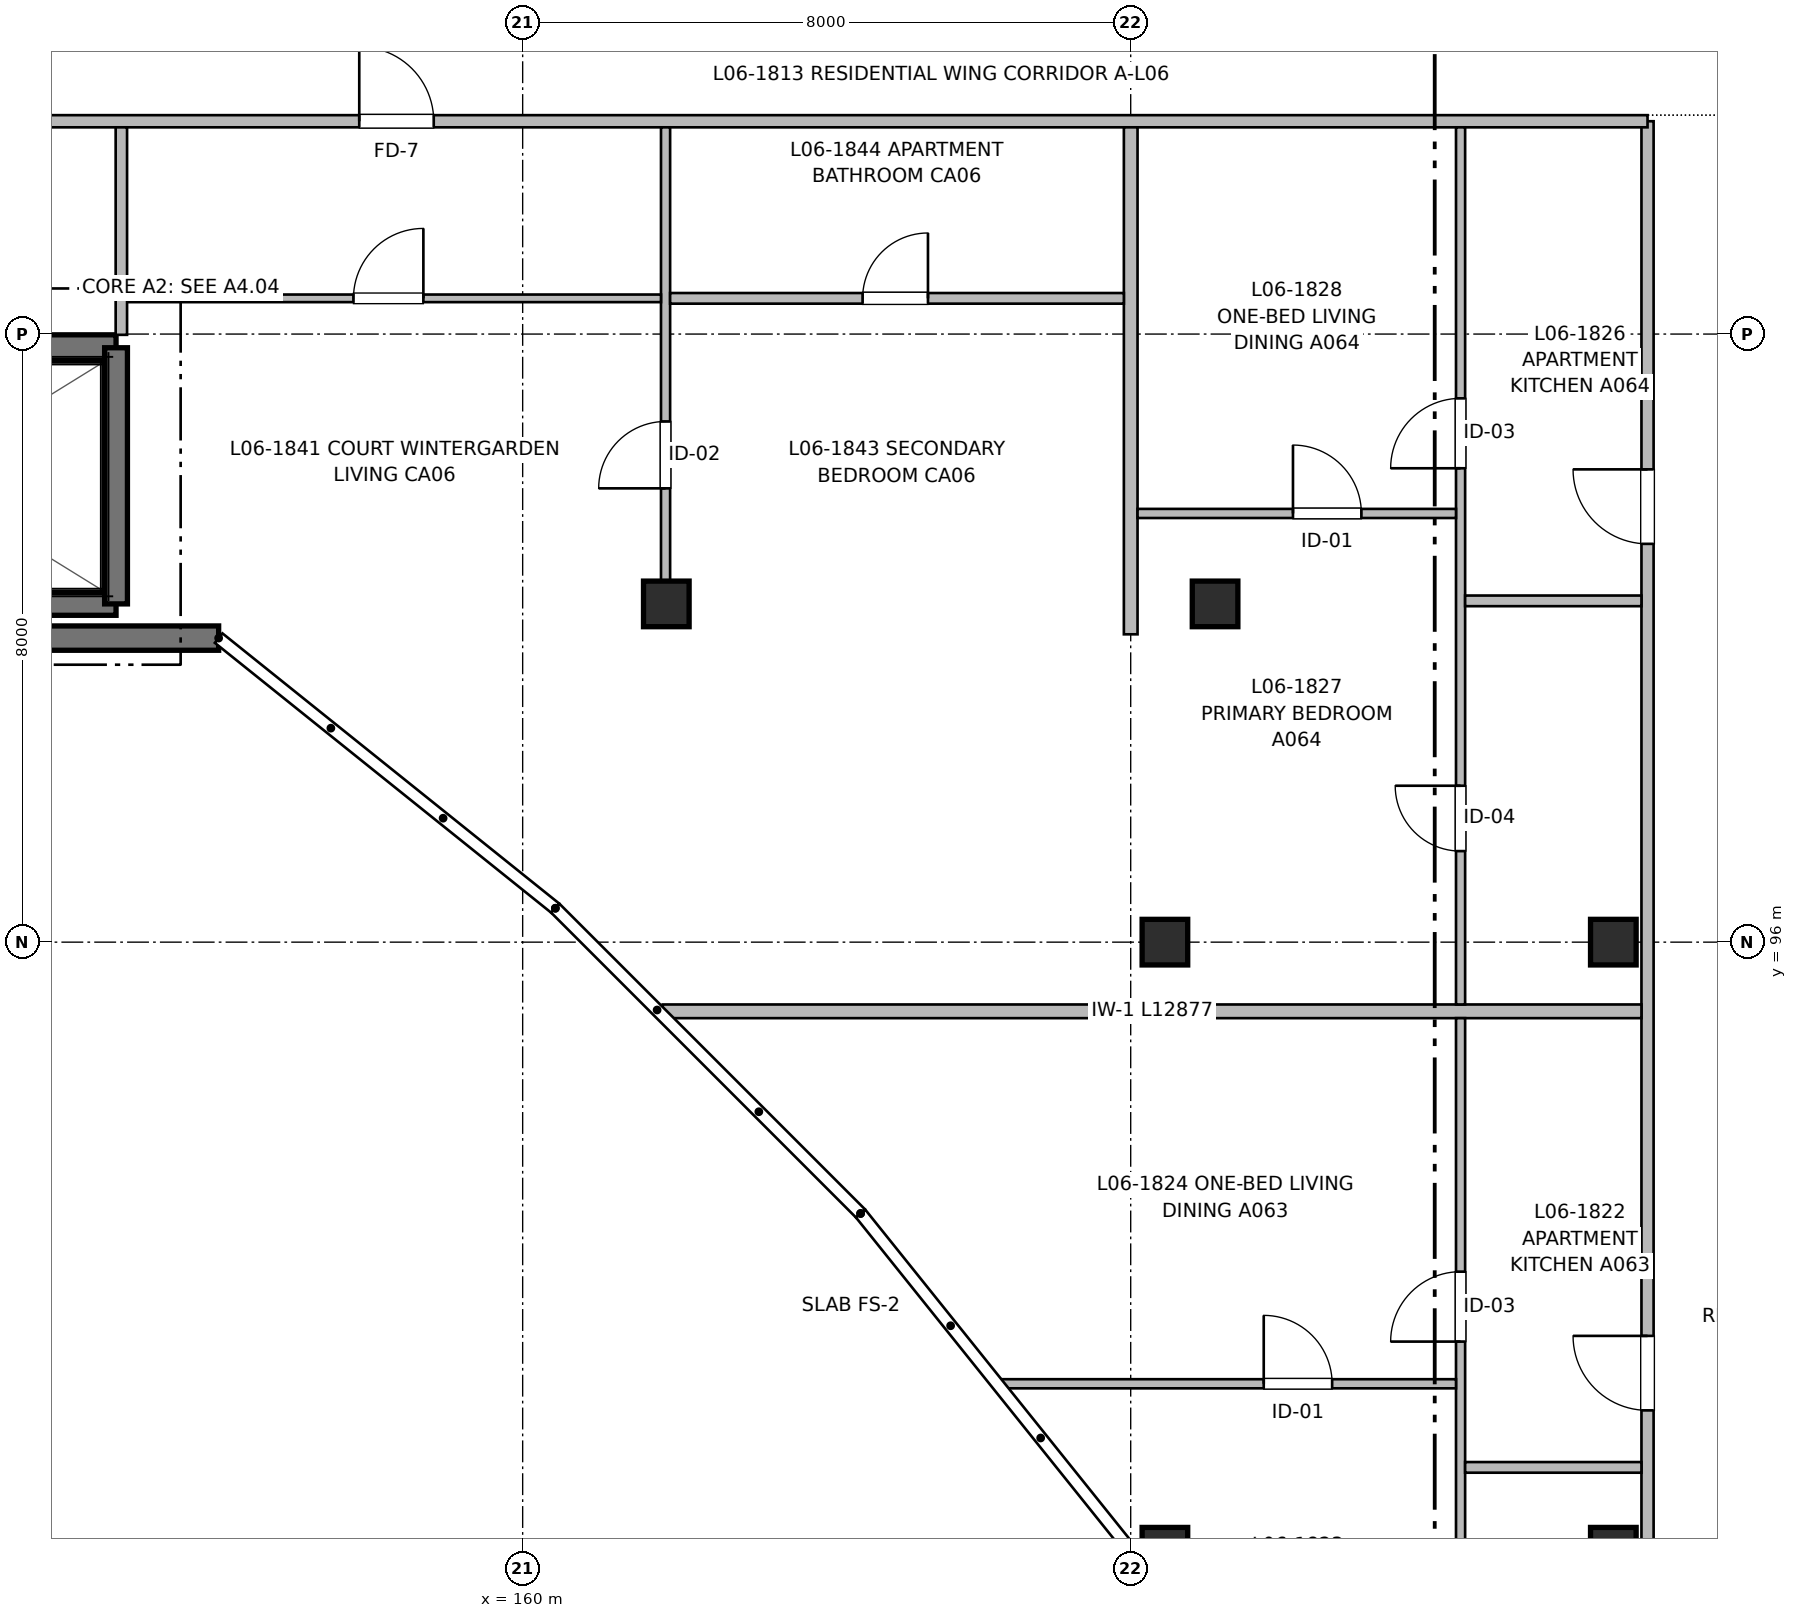
"""IFC4 building model, lengths in metres.
Left out: names, types, materials, properties, quantities, classifications, styles, units other than length and angle.
Written with IfcOpenShell. Run it as: python <this file> out.ifc"""

import sys

from ifc_helpers import new_model, si_unit, direction, frame, frame_2d, origin, origin_2d, place, context, subcontext, project, spatial, rectangle, extrude, element, fill, save


model = new_model("IFC4")
c1 = context("Model", 3, precision=1e-05, world=origin(), true_north=direction((0.0, 1.0)))
c2 = subcontext(c1, "Body", "Model", "MODEL_VIEW")
j1 = project(units=[si_unit("LENGTHUNIT", "METRE"), si_unit("PLANEANGLEUNIT", "RADIAN")], contexts=[c1])
p1 = place(None, origin())
s1 = spatial("IfcSite", under=j1, at=p1, CompositionType="ELEMENT")
p2 = place(p1, origin())
s2 = spatial("IfcBuilding", under=s1, at=p2, CompositionType="ELEMENT")
p3 = place(p2, frame((0.0, 0.0, 20.16)))
s3 = spatial("IfcBuildingStorey", under=s2, at=p3, CompositionType="ELEMENT", Elevation=20.16)
for number, where, z_axis, x_axis in (
    (1, (161.89, 100.45, 0.0), (0.0, 0.0, 1.0), (1.0, 0.0, 0.0)),
    (2, (168.45, 88.0, 0.0), (0.0, 0.0, 1.0), (1.0, 0.0, 0.0)),
    (3, (168.45, 96.0, 0.0), (0.0, 0.0, 1.0), (1.0, 0.0, 0.0)),
    (4, (169.11, 100.45, 0.0), (0.0, 0.0, 1.0), (1.0, 0.0, 0.0)),
    (5, (174.35, 88.0, 0.0), (0.0, 0.0, 1.0), (1.0, 0.0, 0.0)),
    (6, (174.35, 96.0, 0.0), (0.0, 0.0, 1.0), (1.0, 0.0, 0.0)),
):
    element("IfcColumn", number, at=place(p3, frame(where, z_axis=z_axis, x_axis=x_axis)), inside=s3, PredefinedType="COLUMN", context=c2, shape_type="SweptSolid", body=[
        extrude(rectangle(XDim=0.6, YDim=0.6, at=origin_2d()), origin(), (0.0, 0.0, 1.0), 3.2),
    ])
p4 = place(p3, frame((147.75, 100.45, 0.0), z_axis=(0.0, 0.0, 1.0), x_axis=(1.0, 0.0, 0.0)))
e7 = element("IfcWall", 7, at=p4, inside=s3, PredefinedType="SHEAR", context=c2, shape_type="SweptSolid", body=[
    extrude(rectangle(XDim=6.9, YDim=0.3, at=frame_2d((3.45, 0.0))), origin(), (0.0, 0.0, 1.0), 3.2),
])
p5 = place(p3, frame((154.65, 103.82, 0.0), z_axis=(0.0, 0.0, 1.0), x_axis=(-1.0, 0.0, 0.0)))
e8 = element("IfcWall", 8, at=p5, inside=s3, PredefinedType="SHEAR", context=c2, shape_type="SweptSolid", body=[
    extrude(rectangle(XDim=6.9, YDim=0.34, at=frame_2d((3.45, 0.0))), origin(), (0.0, 0.0, 1.0), 3.2),
])
p6 = place(p5, frame((5.25, 0.0, 0.0)))
e9 = element("IfcOpeningElement", 9, at=p6, cuts=e8, PredefinedType="OPENING", context=c2, shape_type="SweptSolid", body=[
    extrude(rectangle(XDim=1.05, YDim=2.15, at=frame_2d((0.525, 1.075))), frame((0.0, 0.18, 0.0), z_axis=(0.0, -1.0, 0.0), x_axis=(1.0, 0.0, 0.0)), (0.0, 0.0, 1.0), 0.36),
])
p7 = place(p3, frame((154.65, 100.45, 0.0), z_axis=(0.0, 0.0, 1.0), x_axis=(0.0, 1.0, 0.0)))
e10 = element("IfcWall", 10, at=p7, inside=s3, PredefinedType="SHEAR", context=c2, shape_type="SweptSolid", body=[
    extrude(rectangle(XDim=3.37, YDim=0.3, at=frame_2d((1.685, 0.0))), origin(), (0.0, 0.0, 1.0), 3.2),
])
p8 = place(p3, frame((156.0, 100.0, 0.0), z_axis=(0.0, 0.0, 1.0), x_axis=(-1.0, 0.0, 0.0)))
e11 = element("IfcWall", 11, at=p8, inside=s3, PredefinedType="SHEAR", context=c2, shape_type="SweptSolid", body=[
    extrude(rectangle(XDim=9.0, YDim=0.32, at=frame_2d((4.5, 0.0))), origin(), (0.0, 0.0, 1.0), 2.98),
])
p9 = place(p8, frame((3.3, 0.0, 0.72)))
e12 = element("IfcOpeningElement", 12, at=p9, cuts=e11, PredefinedType="OPENING", context=c2, shape_type="SweptSolid", body=[
    extrude(rectangle(XDim=2.4, YDim=1.5, at=frame_2d((1.2, 0.75))), frame((0.0, 0.17, 0.0), z_axis=(0.0, -1.0, 0.0), x_axis=(1.0, 0.0, 0.0)), (0.0, 0.0, 1.0), 0.34),
])
p10 = place(p3, frame((174.8, 56.16, 0.0), z_axis=(0.0, 0.0, 1.0), x_axis=(0.0, 1.0, 0.0)))
e13 = element("IfcWall", 13, at=p10, inside=s3, PredefinedType="PARTITIONING", context=c2, shape_type="SweptSolid", body=[
    extrude(rectangle(XDim=50.64, YDim=0.16, at=frame_2d((25.32, 0.0))), origin(), (0.0, 0.0, 1.0), 2.935),
])
p11 = place(p10, frame((5.63, 0.0, 0.0)))
e14 = element("IfcOpeningElement", 14, at=p11, cuts=e13, PredefinedType="OPENING", context=c2, shape_type="SweptSolid", body=[
    extrude(rectangle(XDim=1.5, YDim=2.2, at=frame_2d((0.75, 1.1))), frame((0.0, 0.09, 0.0), z_axis=(0.0, -1.0, 0.0), x_axis=(1.0, 0.0, 0.0)), (0.0, 0.0, 1.0), 0.18),
])
p12 = place(p10, frame((20.92, 0.0, 0.0)))
e15 = element("IfcOpeningElement", 15, at=p12, cuts=e13, PredefinedType="OPENING", context=c2, shape_type="SweptSolid", body=[
    extrude(rectangle(XDim=0.98, YDim=2.15, at=frame_2d((0.49, 1.075))), frame((0.0, 0.09, 0.0), z_axis=(0.0, -1.0, 0.0), x_axis=(1.0, 0.0, 0.0)), (0.0, 0.0, 1.0), 0.18),
])
p13 = place(p10, frame((33.68, 0.0, 0.0)))
e16 = element("IfcOpeningElement", 16, at=p13, cuts=e13, PredefinedType="OPENING", context=c2, shape_type="SweptSolid", body=[
    extrude(rectangle(XDim=0.98, YDim=2.15, at=frame_2d((0.49, 1.075))), frame((0.0, 0.09, 0.0), z_axis=(0.0, -1.0, 0.0), x_axis=(1.0, 0.0, 0.0)), (0.0, 0.0, 1.0), 0.18),
])
p14 = place(p10, frame((45.08, 0.0, 0.0)))
e17 = element("IfcOpeningElement", 17, at=p14, cuts=e13, PredefinedType="OPENING", context=c2, shape_type="SweptSolid", body=[
    extrude(rectangle(XDim=0.98, YDim=2.15, at=frame_2d((0.49, 1.075))), frame((0.0, 0.09, 0.0), z_axis=(0.0, -1.0, 0.0), x_axis=(1.0, 0.0, 0.0)), (0.0, 0.0, 1.0), 0.18),
])
p15 = place(p3, frame((147.16, 106.8, 0.0), z_axis=(0.0, 0.0, 1.0), x_axis=(1.0, 0.0, 0.0)))
e18 = element("IfcWall", 18, at=p15, inside=s3, PredefinedType="PARTITIONING", context=c2, shape_type="SweptSolid", body=[
    extrude(rectangle(XDim=27.64, YDim=0.16, at=frame_2d((13.82, 0.0))), origin(), (0.0, 0.0, 1.0), 2.935),
])
p16 = place(p15, frame((3.515, 0.0, 0.0)))
e19 = element("IfcOpeningElement", 19, at=p16, cuts=e18, PredefinedType="OPENING", context=c2, shape_type="SweptSolid", body=[
    extrude(rectangle(XDim=1.05, YDim=2.15, at=frame_2d((0.525, 1.075))), frame((0.0, 0.09, 0.0), z_axis=(0.0, -1.0, 0.0), x_axis=(1.0, 0.0, 0.0)), (0.0, 0.0, 1.0), 0.18),
])
p17 = place(p15, frame((10.69, 0.0, 0.0)))
e20 = element("IfcOpeningElement", 20, at=p17, cuts=e18, PredefinedType="OPENING", context=c2, shape_type="SweptSolid", body=[
    extrude(rectangle(XDim=0.98, YDim=2.15, at=frame_2d((0.49, 1.075))), frame((0.0, 0.09, 0.0), z_axis=(0.0, -1.0, 0.0), x_axis=(1.0, 0.0, 0.0)), (0.0, 0.0, 1.0), 0.18),
])
p18 = place(p3, frame((168.0, 100.05, 0.0), z_axis=(0.0, 0.0, 1.0), x_axis=(0.0, 1.0, 0.0)))
e21 = element("IfcWall", 21, at=p18, inside=s3, PredefinedType="PARTITIONING", context=c2, shape_type="SweptSolid", body=[
    extrude(rectangle(XDim=6.67, YDim=0.18, at=frame_2d((3.335, 0.0))), origin(), (0.0, 0.0, 1.0), 2.935),
])
p19 = place(p3, frame((154.72, 103.99, 0.0), z_axis=(0.0, 0.0, 1.0), x_axis=(0.0, 1.0, 0.0)))
e22 = element("IfcWall", 22, at=p19, inside=s3, PredefinedType="PARTITIONING", context=c2, shape_type="SweptSolid", body=[
    extrude(rectangle(XDim=2.73, YDim=0.15, at=frame_2d((1.365, 0.0))), origin(), (0.0, 0.0, 1.0), 2.935),
])
p20 = place(p3, frame((161.843, 95.09, 0.0), z_axis=(0.0, 0.0, 1.0), x_axis=(1.0, 0.0, 0.0)))
e23 = element("IfcWall", 23, at=p20, inside=s3, PredefinedType="PARTITIONING", context=c2, shape_type="SweptSolid", body=[
    extrude(rectangle(XDim=12.877, YDim=0.18, at=frame_2d((6.439, 0.0))), origin(), (0.0, 0.0, 1.0), 2.935),
])
p21 = place(p3, frame((172.34, 84.06, 0.0), z_axis=(0.0, 0.0, 1.0), x_axis=(0.0, 1.0, 0.0)))
e24 = element("IfcWall", 24, at=p21, inside=s3, PredefinedType="PARTITIONING", context=c2, shape_type="SweptSolid", body=[
    extrude(rectangle(XDim=10.94, YDim=0.12, at=frame_2d((5.47, 0.0))), origin(), (0.0, 0.0, 1.0), 2.935),
])
p22 = place(p21, frame((1.911, 0.0, 0.0)))
e25 = element("IfcOpeningElement", 25, at=p22, cuts=e24, PredefinedType="OPENING", context=c2, shape_type="SweptSolid", body=[
    extrude(rectangle(XDim=0.86, YDim=2.1, at=frame_2d((0.43, 1.05))), frame((0.0, 0.07, 0.0), z_axis=(0.0, -1.0, 0.0), x_axis=(1.0, 0.0, 0.0)), (0.0, 0.0, 1.0), 0.14),
])
p23 = place(p21, frame((6.685, 0.0, 0.0)))
e26 = element("IfcOpeningElement", 26, at=p23, cuts=e24, PredefinedType="OPENING", context=c2, shape_type="SweptSolid", body=[
    extrude(rectangle(XDim=0.92, YDim=2.1, at=frame_2d((0.46, 1.05))), frame((0.0, 0.07, 0.0), z_axis=(0.0, -1.0, 0.0), x_axis=(1.0, 0.0, 0.0)), (0.0, 0.0, 1.0), 0.14),
])
p24 = place(p3, frame((172.4, 89.09, 0.0), z_axis=(0.0, 0.0, 1.0), x_axis=(1.0, 0.0, 0.0)))
e27 = element("IfcWall", 27, at=p24, inside=s3, PredefinedType="PARTITIONING", context=c2, shape_type="SweptSolid", body=[
    extrude(rectangle(XDim=2.32, YDim=0.14, at=frame_2d((1.16, 0.0))), origin(), (0.0, 0.0, 1.0), 2.935),
])
p25 = place(p3, frame((166.294, 90.19, 0.0), z_axis=(0.0, 0.0, 1.0), x_axis=(1.0, 0.0, 0.0)))
e28 = element("IfcWall", 28, at=p25, inside=s3, PredefinedType="PARTITIONING", context=c2, shape_type="SweptSolid", body=[
    extrude(rectangle(XDim=5.986, YDim=0.12, at=frame_2d((2.993, 0.0))), origin(), (0.0, 0.0, 1.0), 2.935),
])
p26 = place(p25, frame((3.456, 0.0, 0.0)))
e29 = element("IfcOpeningElement", 29, at=p26, cuts=e28, PredefinedType="OPENING", context=c2, shape_type="SweptSolid", body=[
    extrude(rectangle(XDim=0.9, YDim=2.1, at=frame_2d((0.45, 1.05))), frame((0.0, 0.07, 0.0), z_axis=(0.0, -1.0, 0.0), x_axis=(1.0, 0.0, 0.0)), (0.0, 0.0, 1.0), 0.14),
])
p27 = place(p3, frame((172.34, 95.18, 0.0), z_axis=(0.0, 0.0, 1.0), x_axis=(0.0, 1.0, 0.0)))
e30 = element("IfcWall", 30, at=p27, inside=s3, PredefinedType="PARTITIONING", context=c2, shape_type="SweptSolid", body=[
    extrude(rectangle(XDim=11.54, YDim=0.12, at=frame_2d((5.77, 0.0))), origin(), (0.0, 0.0, 1.0), 2.935),
])
p28 = place(p27, frame((2.018, 0.0, 0.0)))
e31 = element("IfcOpeningElement", 31, at=p28, cuts=e30, PredefinedType="OPENING", context=c2, shape_type="SweptSolid", body=[
    extrude(rectangle(XDim=0.86, YDim=2.1, at=frame_2d((0.43, 1.05))), frame((0.0, 0.07, 0.0), z_axis=(0.0, -1.0, 0.0), x_axis=(1.0, 0.0, 0.0)), (0.0, 0.0, 1.0), 0.14),
])
p29 = place(p27, frame((7.054, 0.0, 0.0)))
e32 = element("IfcOpeningElement", 32, at=p29, cuts=e30, PredefinedType="OPENING", context=c2, shape_type="SweptSolid", body=[
    extrude(rectangle(XDim=0.92, YDim=2.1, at=frame_2d((0.46, 1.05))), frame((0.0, 0.07, 0.0), z_axis=(0.0, -1.0, 0.0), x_axis=(1.0, 0.0, 0.0)), (0.0, 0.0, 1.0), 0.14),
])
p30 = place(p3, frame((172.4, 100.49, 0.0), z_axis=(0.0, 0.0, 1.0), x_axis=(1.0, 0.0, 0.0)))
e33 = element("IfcWall", 33, at=p30, inside=s3, PredefinedType="PARTITIONING", context=c2, shape_type="SweptSolid", body=[
    extrude(rectangle(XDim=2.32, YDim=0.14, at=frame_2d((1.16, 0.0))), origin(), (0.0, 0.0, 1.0), 2.73),
])
p31 = place(p3, frame((168.09, 101.64, 0.0), z_axis=(0.0, 0.0, 1.0), x_axis=(1.0, 0.0, 0.0)))
e34 = element("IfcWall", 34, at=p31, inside=s3, PredefinedType="PARTITIONING", context=c2, shape_type="SweptSolid", body=[
    extrude(rectangle(XDim=4.19, YDim=0.12, at=frame_2d((2.095, 0.0))), origin(), (0.0, 0.0, 1.0), 2.935),
])
p32 = place(p31, frame((2.045, 0.0, 0.0)))
e35 = element("IfcOpeningElement", 35, at=p32, cuts=e34, PredefinedType="OPENING", context=c2, shape_type="SweptSolid", body=[
    extrude(rectangle(XDim=0.9, YDim=2.1, at=frame_2d((0.45, 1.05))), frame((0.0, 0.07, 0.0), z_axis=(0.0, -1.0, 0.0), x_axis=(1.0, 0.0, 0.0)), (0.0, 0.0, 1.0), 0.14),
])
p33 = place(p3, frame((161.88, 100.16, 0.0), z_axis=(0.0, 0.0, 1.0), x_axis=(0.0, 1.0, 0.0)))
e36 = element("IfcWall", 36, at=p33, inside=s3, PredefinedType="PARTITIONING", context=c2, shape_type="SweptSolid", body=[
    extrude(rectangle(XDim=6.56, YDim=0.12, at=frame_2d((3.28, 0.0))), origin(), (0.0, 0.0, 1.0), 2.68),
])
p34 = place(p33, frame((1.81, 0.0, 0.0)))
e37 = element("IfcOpeningElement", 37, at=p34, cuts=e36, PredefinedType="OPENING", context=c2, shape_type="SweptSolid", body=[
    extrude(rectangle(XDim=0.88, YDim=2.1, at=frame_2d((0.44, 1.05))), frame((0.0, 0.07, 0.0), z_axis=(0.0, -1.0, 0.0), x_axis=(1.0, 0.0, 0.0)), (0.0, 0.0, 1.0), 0.14),
])
p35 = place(p3, frame((161.94, 104.47, 0.0), z_axis=(0.0, 0.0, 1.0), x_axis=(1.0, 0.0, 0.0)))
e38 = element("IfcWall", 38, at=p35, inside=s3, PredefinedType="PARTITIONING", context=c2, shape_type="SweptSolid", body=[
    extrude(rectangle(XDim=5.97, YDim=0.14, at=frame_2d((2.985, 0.0))), origin(), (0.0, 0.0, 1.0), 2.935),
])
p36 = place(p35, frame((2.533, 0.0, 0.0)))
e39 = element("IfcOpeningElement", 39, at=p36, cuts=e38, PredefinedType="OPENING", context=c2, shape_type="SweptSolid", body=[
    extrude(rectangle(XDim=0.86, YDim=2.1, at=frame_2d((0.43, 1.05))), frame((0.0, 0.08, 0.0), z_axis=(0.0, -1.0, 0.0), x_axis=(1.0, 0.0, 0.0)), (0.0, 0.0, 1.0), 0.16),
])
p37 = place(p3, frame((154.8, 104.47, 0.0), z_axis=(0.0, 0.0, 1.0), x_axis=(1.0, 0.0, 0.0)))
e40 = element("IfcWall", 40, at=p37, inside=s3, PredefinedType="PARTITIONING", context=c2, shape_type="SweptSolid", body=[
    extrude(rectangle(XDim=7.02, YDim=0.1, at=frame_2d((3.51, 0.0))), origin(), (0.0, 0.0, 1.0), 2.935),
])
p38 = place(p37, frame((2.974, 0.0, 0.0)))
e41 = element("IfcOpeningElement", 41, at=p38, cuts=e40, PredefinedType="OPENING", context=c2, shape_type="SweptSolid", body=[
    extrude(rectangle(XDim=0.92, YDim=2.1, at=frame_2d((0.46, 1.05))), frame((0.0, 0.06, 0.0), z_axis=(0.0, -1.0, 0.0), x_axis=(1.0, 0.0, 0.0)), (0.0, 0.0, 1.0), 0.12),
])
p39 = place(p23, origin())
e42 = element("IfcDoor", 42, at=p39, inside=s3, OperationType="SINGLE_SWING_LEFT", PredefinedType="DOOR", context=c2, shape_type="SweptSolid", body=[
    extrude(rectangle(XDim=0.92, YDim=2.1, at=frame_2d((0.46, 1.05))), frame((0.0, 0.025, 0.0), z_axis=(0.0, -1.0, 0.0), x_axis=(1.0, 0.0, 0.0)), (0.0, 0.0, 1.0), 0.05),
])
fill(e26, e42)
p40 = place(p13, origin())
e43 = element("IfcDoor", 43, at=p40, inside=s3, OperationType="SINGLE_SWING_RIGHT", PredefinedType="DOOR", context=c2, shape_type="SweptSolid", body=[
    extrude(rectangle(XDim=0.98, YDim=2.15, at=frame_2d((0.49, 1.075))), frame((0.0, 0.025, 0.0), z_axis=(0.0, -1.0, 0.0), x_axis=(1.0, 0.0, 0.0)), (0.0, 0.0, 1.0), 0.05),
])
fill(e16, e43)
p41 = place(p26, origin())
e44 = element("IfcDoor", 44, at=p41, inside=s3, OperationType="SINGLE_SWING_LEFT", PredefinedType="DOOR", context=c2, shape_type="SweptSolid", body=[
    extrude(rectangle(XDim=0.9, YDim=2.1, at=frame_2d((0.45, 1.05))), frame((0.0, 0.025, 0.0), z_axis=(0.0, -1.0, 0.0), x_axis=(1.0, 0.0, 0.0)), (0.0, 0.0, 1.0), 0.05),
])
fill(e29, e44)
p42 = place(p28, origin())
e45 = element("IfcDoor", 45, at=p42, inside=s3, OperationType="SINGLE_SWING_RIGHT", PredefinedType="DOOR", context=c2, shape_type="SweptSolid", body=[
    extrude(rectangle(XDim=0.86, YDim=2.1, at=frame_2d((0.43, 1.05))), frame((0.0, 0.025, 0.0), z_axis=(0.0, -1.0, 0.0), x_axis=(1.0, 0.0, 0.0)), (0.0, 0.0, 1.0), 0.05),
])
fill(e31, e45)
p43 = place(p29, origin())
e46 = element("IfcDoor", 46, at=p43, inside=s3, OperationType="SINGLE_SWING_LEFT", PredefinedType="DOOR", context=c2, shape_type="SweptSolid", body=[
    extrude(rectangle(XDim=0.92, YDim=2.1, at=frame_2d((0.46, 1.05))), frame((0.0, 0.025, 0.0), z_axis=(0.0, -1.0, 0.0), x_axis=(1.0, 0.0, 0.0)), (0.0, 0.0, 1.0), 0.05),
])
fill(e32, e46)
p44 = place(p14, origin())
e47 = element("IfcDoor", 47, at=p44, inside=s3, OperationType="SINGLE_SWING_RIGHT", PredefinedType="DOOR", context=c2, shape_type="SweptSolid", body=[
    extrude(rectangle(XDim=0.98, YDim=2.15, at=frame_2d((0.49, 1.075))), frame((0.0, 0.025, 0.0), z_axis=(0.0, -1.0, 0.0), x_axis=(1.0, 0.0, 0.0)), (0.0, 0.0, 1.0), 0.05),
])
fill(e17, e47)
p45 = place(p32, origin())
e48 = element("IfcDoor", 48, at=p45, inside=s3, OperationType="SINGLE_SWING_LEFT", PredefinedType="DOOR", context=c2, shape_type="SweptSolid", body=[
    extrude(rectangle(XDim=0.9, YDim=2.1, at=frame_2d((0.45, 1.05))), frame((0.0, 0.025, 0.0), z_axis=(0.0, -1.0, 0.0), x_axis=(1.0, 0.0, 0.0)), (0.0, 0.0, 1.0), 0.05),
])
fill(e35, e48)
p46 = place(p17, origin())
e49 = element("IfcDoor", 49, at=p46, inside=s3, OperationType="SINGLE_SWING_LEFT", PredefinedType="DOOR", context=c2, shape_type="SweptSolid", body=[
    extrude(rectangle(XDim=0.98, YDim=2.15, at=frame_2d((0.49, 1.075))), frame((0.0, 0.025, 0.0), z_axis=(0.0, -1.0, 0.0), x_axis=(1.0, 0.0, 0.0)), (0.0, 0.0, 1.0), 0.05),
])
fill(e20, e49)
p47 = place(p38, origin())
e50 = element("IfcDoor", 50, at=p47, inside=s3, OperationType="SINGLE_SWING_RIGHT", PredefinedType="DOOR", context=c2, shape_type="SweptSolid", body=[
    extrude(rectangle(XDim=0.92, YDim=2.1, at=frame_2d((0.46, 1.05))), frame((0.0, 0.025, 0.0), z_axis=(0.0, -1.0, 0.0), x_axis=(1.0, 0.0, 0.0)), (0.0, 0.0, 1.0), 0.05),
])
fill(e41, e50)
p48 = place(p34, origin())
e51 = element("IfcDoor", 51, at=p48, inside=s3, OperationType="SINGLE_SWING_LEFT", PredefinedType="DOOR", context=c2, shape_type="SweptSolid", body=[
    extrude(rectangle(XDim=0.88, YDim=2.1, at=frame_2d((0.44, 1.05))), frame((0.0, 0.025, 0.0), z_axis=(0.0, -1.0, 0.0), x_axis=(1.0, 0.0, 0.0)), (0.0, 0.0, 1.0), 0.05),
])
fill(e37, e51)
p49 = place(p36, origin())
e52 = element("IfcDoor", 52, at=p49, inside=s3, OperationType="SINGLE_SWING_RIGHT", PredefinedType="DOOR", context=c2, shape_type="SweptSolid", body=[
    extrude(rectangle(XDim=0.86, YDim=2.1, at=frame_2d((0.43, 1.05))), frame((0.0, 0.025, 0.0), z_axis=(0.0, -1.0, 0.0), x_axis=(1.0, 0.0, 0.0)), (0.0, 0.0, 1.0), 0.05),
])
fill(e39, e52)
save(model, sys.argv[1])
